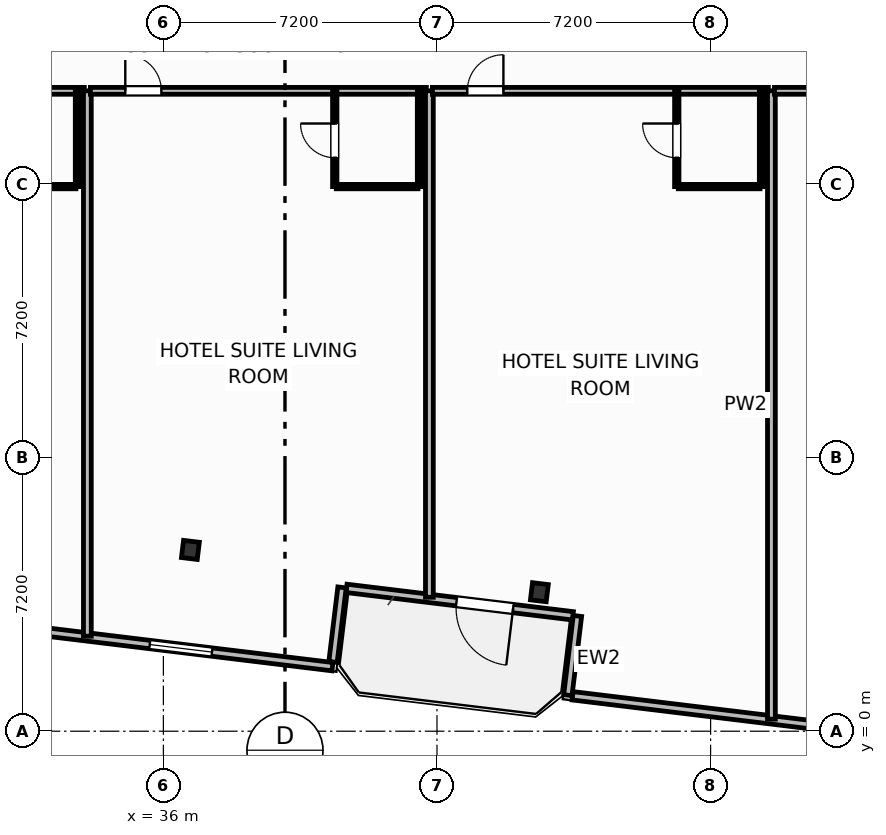
"""IFC4 building model, lengths in metres.
Left out: names, types, materials, properties, quantities, classifications, styles, units other than length and angle.
Written with IfcOpenShell. Run it as: python <this file> out.ifc"""

import sys

from ifc_helpers import new_model, si_unit, direction, frame, frame_2d, origin, origin_2d, place, context, subcontext, project, spatial, rectangle, i_section, extrude, element, fill, save


model = new_model("IFC4")
c1 = context("Model", 3, precision=1e-05, world=origin(), true_north=direction((0.0, 1.0)))
c2 = subcontext(c1, "Body", "Model", "MODEL_VIEW")
j1 = project(units=[si_unit("LENGTHUNIT", "METRE"), si_unit("PLANEANGLEUNIT", "RADIAN")], contexts=[c1])
p1 = place(None, origin())
s1 = spatial("IfcSite", under=j1, at=p1, CompositionType="ELEMENT")
p2 = place(p1, origin())
s2 = spatial("IfcBuilding", under=s1, at=p2, CompositionType="ELEMENT")
p3 = place(p2, frame((0.0, 0.0, 143.9)))
s3 = spatial("IfcBuildingStorey", under=s2, at=p3, CompositionType="ELEMENT", Elevation=143.9)
for number, where, z_axis, x_axis in (
    (1, (36.711, 4.77, 0.0), (0.0, 0.0, 1.0), (0.993, -0.12, 0.0)),
    (2, (45.894, 3.657, 0.0), (0.0, 0.0, 1.0), (0.993, -0.12, 0.0)),
):
    element("IfcColumn", number, at=place(p3, frame(where, z_axis=z_axis, x_axis=x_axis)), inside=s3, PredefinedType="COLUMN", context=c2, shape_type="SweptSolid", body=[
        extrude(i_section(OverallWidth=0.418, OverallDepth=0.455, WebThickness=0.042, FlangeThickness=0.068, FilletRadius=0.025, at=origin_2d()), origin(), (0.0, 0.0, 1.0), 3.7),
    ])
p4 = place(p3, frame((46.776, 3.037, 0.0), z_axis=(0.0, 0.0, 1.0), x_axis=(-0.992735402148, 0.120318000826, 0.0)))
e3 = element("IfcWall", 3, at=p4, inside=s3, PredefinedType="SOLIDWALL", context=c2, shape_type="SweptSolid", body=[
    extrude(rectangle(XDim=6.0, YDim=0.22, at=frame_2d((3.0, 0.0))), origin(), (0.0, 0.0, 1.0), 2.73),
])
p5 = place(p4, frame((1.584, 0.0, 0.0)))
e4 = element("IfcOpeningElement", 4, at=p5, cuts=e3, PredefinedType="OPENING", context=c2, shape_type="SweptSolid", body=[
    extrude(rectangle(XDim=1.5, YDim=2.25, at=frame_2d((0.75, 1.125))), frame((0.0, 0.12, 0.0), z_axis=(0.0, -1.0, 0.0), x_axis=(1.0, 0.0, 0.0)), (0.0, 0.0, 1.0), 0.24),
])
p6 = place(p3, frame((32.472, 2.665, 0.0), z_axis=(0.0, 0.0, 1.0), x_axis=(0.992734661931, -0.120324108143, 0.0)))
e5 = element("IfcWall", 5, at=p6, inside=s3, PredefinedType="SOLIDWALL", context=c2, shape_type="SweptSolid", body=[
    extrude(rectangle(XDim=8.035, YDim=0.22, at=frame_2d((4.018, 0.0))), origin(), (0.0, 0.0, 1.0), 2.73),
])
p7 = place(p6, frame((3.192, 0.0, 0.8)))
e6 = element("IfcOpeningElement", 6, at=p7, cuts=e5, PredefinedType="OPENING", context=c2, shape_type="SweptSolid", body=[
    extrude(rectangle(XDim=1.65, YDim=1.65, at=frame_2d((0.825, 0.825))), frame((0.0, 0.12, 0.0), z_axis=(0.0, -1.0, 0.0), x_axis=(1.0, 0.0, 0.0)), (0.0, 0.0, 1.0), 0.24),
])
p8 = place(p3, frame((40.464, 1.822, 0.0), z_axis=(0.0, 0.0, 1.0), x_axis=(0.120275992932, 0.992740492538, 0.0)))
e7 = element("IfcWall", 7, at=p8, inside=s3, PredefinedType="SOLIDWALL", context=c2, shape_type="SweptSolid", body=[
    extrude(rectangle(XDim=1.975, YDim=0.22, at=frame_2d((0.988, 0.0))), origin(), (0.0, 0.0, 1.0), 2.73),
])
p9 = place(p3, frame((46.896, 3.032, 0.0), z_axis=(0.0, 0.0, 1.0), x_axis=(-0.120327895535, -0.992734202874, 0.0)))
e8 = element("IfcWall", 8, at=p9, inside=s3, PredefinedType="SOLIDWALL", context=c2, shape_type="SweptSolid", body=[
    extrude(rectangle(XDim=2.1, YDim=0.22, at=frame_2d((1.05, 0.0))), origin(), (0.0, 0.0, 1.0), 2.73),
])
p10 = place(p3, frame((46.768, 0.932, 0.0), z_axis=(0.0, 0.0, 1.0), x_axis=(0.992733036814, -0.120337515419, 0.0)))
e9 = element("IfcWall", 9, at=p10, inside=s3, PredefinedType="SOLIDWALL", context=c2, shape_type="SweptSolid", body=[
    extrude(rectangle(XDim=21.347, YDim=0.22, at=frame_2d((10.673, 0.0))), origin(), (0.0, 0.0, 1.0), 2.73),
])
p11 = place(p10, frame((9.849, 0.0, 0.8)))
e10 = element("IfcOpeningElement", 10, at=p11, cuts=e9, PredefinedType="OPENING", context=c2, shape_type="SweptSolid", body=[
    extrude(rectangle(XDim=1.65, YDim=1.65, at=frame_2d((0.825, 0.825))), frame((0.0, 0.12, 0.0), z_axis=(0.0, -1.0, 0.0), x_axis=(1.0, 0.0, 0.0)), (0.0, 0.0, 1.0), 0.24),
])
p12 = place(p3, frame((25.08, 16.85, 0.0), z_axis=(0.0, 0.0, 1.0), x_axis=(1.0, 0.0, 0.0)))
e11 = element("IfcWall", 11, at=p12, inside=s3, PredefinedType="PARTITIONING", context=c2, shape_type="SweptSolid", body=[
    extrude(rectangle(XDim=8.84, YDim=0.18, at=frame_2d((4.42, 0.0))), origin(), (0.0, 0.0, 1.0), 3.45),
])
p13 = place(p12, frame((0.918, 0.0, 0.0)))
e12 = element("IfcOpeningElement", 12, at=p13, cuts=e11, PredefinedType="OPENING", context=c2, shape_type="SweptSolid", body=[
    extrude(rectangle(XDim=0.95, YDim=2.15, at=frame_2d((0.475, 1.075))), frame((0.0, 0.1, 0.0), z_axis=(0.0, -1.0, 0.0), x_axis=(1.0, 0.0, 0.0)), (0.0, 0.0, 1.0), 0.2),
])
p14 = place(p3, frame((31.55, 14.33, 0.0), z_axis=(0.0, 0.0, 1.0), x_axis=(1.0, 0.0, 0.0)))
e13 = element("IfcWall", 13, at=p14, inside=s3, PredefinedType="PARTITIONING", context=c2, shape_type="SweptSolid", body=[
    extrude(rectangle(XDim=2.15, YDim=0.115, at=frame_2d((1.075, 0.0))), origin(), (0.0, 0.0, 1.0), 3.45),
])
p15 = place(p3, frame((33.74, 14.33, 0.0), z_axis=(0.0, 0.0, 1.0), x_axis=(0.0, 1.0, 0.0)))
e14 = element("IfcWall", 14, at=p15, inside=s3, PredefinedType="PARTITIONING", context=c2, shape_type="SweptSolid", body=[
    extrude(rectangle(XDim=2.52, YDim=0.115, at=frame_2d((1.26, 0.0))), origin(), (0.0, 0.0, 1.0), 3.45),
])
p16 = place(p3, frame((34.0, 2.5, 0.0), z_axis=(0.0, 0.0, 1.0), x_axis=(0.0, 1.0, 0.0)))
e15 = element("IfcWall", 15, at=p16, inside=s3, PredefinedType="PARTITIONING", context=c2, shape_type="SweptSolid", body=[
    extrude(rectangle(XDim=14.35, YDim=0.205, at=frame_2d((7.175, 0.0))), origin(), (0.0, 0.0, 1.0), 3.45),
])
p17 = place(p3, frame((34.08, 16.85, 0.0), z_axis=(0.0, 0.0, 1.0), x_axis=(1.0, 0.0, 0.0)))
e16 = element("IfcWall", 16, at=p17, inside=s3, PredefinedType="PARTITIONING", context=c2, shape_type="SweptSolid", body=[
    extrude(rectangle(XDim=8.84, YDim=0.18, at=frame_2d((4.42, 0.0))), origin(), (0.0, 0.0, 1.0), 3.45),
])
p18 = place(p17, frame((0.918, 0.0, 0.0)))
e17 = element("IfcOpeningElement", 17, at=p18, cuts=e16, PredefinedType="OPENING", context=c2, shape_type="SweptSolid", body=[
    extrude(rectangle(XDim=0.95, YDim=2.15, at=frame_2d((0.475, 1.075))), frame((0.0, 0.1, 0.0), z_axis=(0.0, -1.0, 0.0), x_axis=(1.0, 0.0, 0.0)), (0.0, 0.0, 1.0), 0.2),
])
p19 = place(p3, frame((40.55, 14.33, 0.0), z_axis=(0.0, 0.0, 1.0), x_axis=(1.0, 0.0, 0.0)))
e18 = element("IfcWall", 18, at=p19, inside=s3, PredefinedType="PARTITIONING", context=c2, shape_type="SweptSolid", body=[
    extrude(rectangle(XDim=2.15, YDim=0.115, at=frame_2d((1.075, 0.0))), origin(), (0.0, 0.0, 1.0), 3.45),
])
p20 = place(p3, frame((40.51, 14.33, 0.0), z_axis=(0.0, 0.0, 1.0), x_axis=(0.0, 1.0, 0.0)))
e19 = element("IfcWall", 19, at=p20, inside=s3, PredefinedType="PARTITIONING", context=c2, shape_type="SweptSolid", body=[
    extrude(rectangle(XDim=2.52, YDim=0.115, at=frame_2d((1.26, 0.0))), origin(), (0.0, 0.0, 1.0), 3.45),
])
p21 = place(p20, frame((0.76, 0.0, 0.0)))
e20 = element("IfcOpeningElement", 20, at=p21, cuts=e19, PredefinedType="OPENING", context=c2, shape_type="SweptSolid", body=[
    extrude(rectangle(XDim=0.9, YDim=2.05, at=frame_2d((0.45, 1.025))), frame((0.0, 0.067, 0.0), z_axis=(0.0, -1.0, 0.0), x_axis=(1.0, 0.0, 0.0)), (0.0, 0.0, 1.0), 0.135),
])
p22 = place(p3, frame((42.74, 14.33, 0.0), z_axis=(0.0, 0.0, 1.0), x_axis=(0.0, 1.0, 0.0)))
e21 = element("IfcWall", 21, at=p22, inside=s3, PredefinedType="PARTITIONING", context=c2, shape_type="SweptSolid", body=[
    extrude(rectangle(XDim=2.52, YDim=0.115, at=frame_2d((1.26, 0.0))), origin(), (0.0, 0.0, 1.0), 3.45),
])
p23 = place(p3, frame((43.0, 3.524, 0.0), z_axis=(0.0, 0.0, 1.0), x_axis=(0.0, 1.0, 0.0)))
e22 = element("IfcWall", 22, at=p23, inside=s3, PredefinedType="PARTITIONING", context=c2, shape_type="SweptSolid", body=[
    extrude(rectangle(XDim=13.326, YDim=0.205, at=frame_2d((6.663, 0.0))), origin(), (0.0, 0.0, 1.0), 3.45),
])
p24 = place(p3, frame((43.08, 16.85, 0.0), z_axis=(0.0, 0.0, 1.0), x_axis=(1.0, 0.0, 0.0)))
e23 = element("IfcWall", 23, at=p24, inside=s3, PredefinedType="PARTITIONING", context=c2, shape_type="SweptSolid", body=[
    extrude(rectangle(XDim=8.84, YDim=0.18, at=frame_2d((4.42, 0.0))), origin(), (0.0, 0.0, 1.0), 3.45),
])
p25 = place(p24, frame((0.918, 0.0, 0.0)))
e24 = element("IfcOpeningElement", 24, at=p25, cuts=e23, PredefinedType="OPENING", context=c2, shape_type="SweptSolid", body=[
    extrude(rectangle(XDim=0.95, YDim=2.15, at=frame_2d((0.475, 1.075))), frame((0.0, 0.1, 0.0), z_axis=(0.0, -1.0, 0.0), x_axis=(1.0, 0.0, 0.0)), (0.0, 0.0, 1.0), 0.2),
])
p26 = place(p3, frame((49.55, 14.33, 0.0), z_axis=(0.0, 0.0, 1.0), x_axis=(1.0, 0.0, 0.0)))
e25 = element("IfcWall", 25, at=p26, inside=s3, PredefinedType="PARTITIONING", context=c2, shape_type="SweptSolid", body=[
    extrude(rectangle(XDim=2.15, YDim=0.115, at=frame_2d((1.075, 0.0))), origin(), (0.0, 0.0, 1.0), 3.45),
])
p27 = place(p3, frame((49.51, 14.33, 0.0), z_axis=(0.0, 0.0, 1.0), x_axis=(0.0, 1.0, 0.0)))
e26 = element("IfcWall", 26, at=p27, inside=s3, PredefinedType="PARTITIONING", context=c2, shape_type="SweptSolid", body=[
    extrude(rectangle(XDim=2.52, YDim=0.115, at=frame_2d((1.26, 0.0))), origin(), (0.0, 0.0, 1.0), 3.45),
])
p28 = place(p27, frame((0.76, 0.0, 0.0)))
e27 = element("IfcOpeningElement", 27, at=p28, cuts=e26, PredefinedType="OPENING", context=c2, shape_type="SweptSolid", body=[
    extrude(rectangle(XDim=0.9, YDim=2.05, at=frame_2d((0.45, 1.025))), frame((0.0, 0.067, 0.0), z_axis=(0.0, -1.0, 0.0), x_axis=(1.0, 0.0, 0.0)), (0.0, 0.0, 1.0), 0.135),
])
p29 = place(p3, frame((51.74, 14.33, 0.0), z_axis=(0.0, 0.0, 1.0), x_axis=(0.0, 1.0, 0.0)))
e28 = element("IfcWall", 28, at=p29, inside=s3, PredefinedType="PARTITIONING", context=c2, shape_type="SweptSolid", body=[
    extrude(rectangle(XDim=2.52, YDim=0.115, at=frame_2d((1.26, 0.0))), origin(), (0.0, 0.0, 1.0), 3.45),
])
p30 = place(p3, frame((52.0, 0.318, 0.0), z_axis=(0.0, 0.0, 1.0), x_axis=(0.0, 1.0, 0.0)))
e29 = element("IfcWall", 29, at=p30, inside=s3, PredefinedType="PARTITIONING", context=c2, shape_type="SweptSolid", body=[
    extrude(rectangle(XDim=16.532, YDim=0.205, at=frame_2d((8.266, 0.0))), origin(), (0.0, 0.0, 1.0), 3.45),
])
p31 = place(p3, frame((52.08, 16.85, 0.0), z_axis=(0.0, 0.0, 1.0), x_axis=(1.0, 0.0, 0.0)))
e30 = element("IfcWall", 30, at=p31, inside=s3, PredefinedType="PARTITIONING", context=c2, shape_type="SweptSolid", body=[
    extrude(rectangle(XDim=8.84, YDim=0.18, at=frame_2d((4.42, 0.0))), origin(), (0.0, 0.0, 1.0), 3.45),
])
p32 = place(p31, frame((0.918, 0.0, 0.0)))
e31 = element("IfcOpeningElement", 31, at=p32, cuts=e30, PredefinedType="OPENING", context=c2, shape_type="SweptSolid", body=[
    extrude(rectangle(XDim=0.95, YDim=2.15, at=frame_2d((0.475, 1.075))), frame((0.0, 0.1, 0.0), z_axis=(0.0, -1.0, 0.0), x_axis=(1.0, 0.0, 0.0)), (0.0, 0.0, 1.0), 0.2),
])
p33 = place(p5, origin())
e32 = element("IfcDoor", 32, at=p33, inside=s3, OperationType="SINGLE_SWING_LEFT", PredefinedType="DOOR", context=c2, shape_type="SweptSolid", body=[
    extrude(rectangle(XDim=1.5, YDim=2.25, at=frame_2d((0.75, 1.125))), frame((0.0, 0.025, 0.0), z_axis=(0.0, -1.0, 0.0), x_axis=(1.0, 0.0, 0.0)), (0.0, 0.0, 1.0), 0.05),
])
fill(e4, e32)
p34 = place(p7, origin())
e33 = element("IfcWindow", 33, at=p34, inside=s3, PartitioningType="SINGLE_PANEL", PredefinedType="WINDOW", context=c2, shape_type="SweptSolid", body=[
    extrude(rectangle(XDim=1.65, YDim=1.65, at=frame_2d((0.825, 0.825))), frame((0.0, 0.03, 0.0), z_axis=(0.0, -1.0, 0.0), x_axis=(1.0, 0.0, 0.0)), (0.0, 0.0, 1.0), 0.06),
])
fill(e6, e33)
p35 = place(p18, origin())
e34 = element("IfcDoor", 34, at=p35, inside=s3, OperationType="SINGLE_SWING_LEFT", PredefinedType="DOOR", context=c2, shape_type="SweptSolid", body=[
    extrude(rectangle(XDim=0.95, YDim=2.15, at=frame_2d((0.475, 1.075))), frame((0.0, 0.025, 0.0), z_axis=(0.0, -1.0, 0.0), x_axis=(1.0, 0.0, 0.0)), (0.0, 0.0, 1.0), 0.05),
])
fill(e17, e34)
p36 = place(p21, origin())
e35 = element("IfcDoor", 35, at=p36, inside=s3, OperationType="SINGLE_SWING_RIGHT", PredefinedType="DOOR", context=c2, shape_type="SweptSolid", body=[
    extrude(rectangle(XDim=0.9, YDim=2.05, at=frame_2d((0.45, 1.025))), frame((0.0, 0.025, 0.0), z_axis=(0.0, -1.0, 0.0), x_axis=(1.0, 0.0, 0.0)), (0.0, 0.0, 1.0), 0.05),
])
fill(e20, e35)
p37 = place(p25, origin())
e36 = element("IfcDoor", 36, at=p37, inside=s3, OperationType="SINGLE_SWING_RIGHT", PredefinedType="DOOR", context=c2, shape_type="SweptSolid", body=[
    extrude(rectangle(XDim=0.95, YDim=2.15, at=frame_2d((0.475, 1.075))), frame((0.0, 0.025, 0.0), z_axis=(0.0, -1.0, 0.0), x_axis=(1.0, 0.0, 0.0)), (0.0, 0.0, 1.0), 0.05),
])
fill(e24, e36)
p38 = place(p28, origin())
e37 = element("IfcDoor", 37, at=p38, inside=s3, OperationType="SINGLE_SWING_RIGHT", PredefinedType="DOOR", context=c2, shape_type="SweptSolid", body=[
    extrude(rectangle(XDim=0.9, YDim=2.05, at=frame_2d((0.45, 1.025))), frame((0.0, 0.025, 0.0), z_axis=(0.0, -1.0, 0.0), x_axis=(1.0, 0.0, 0.0)), (0.0, 0.0, 1.0), 0.05),
])
fill(e27, e37)
save(model, sys.argv[1])
